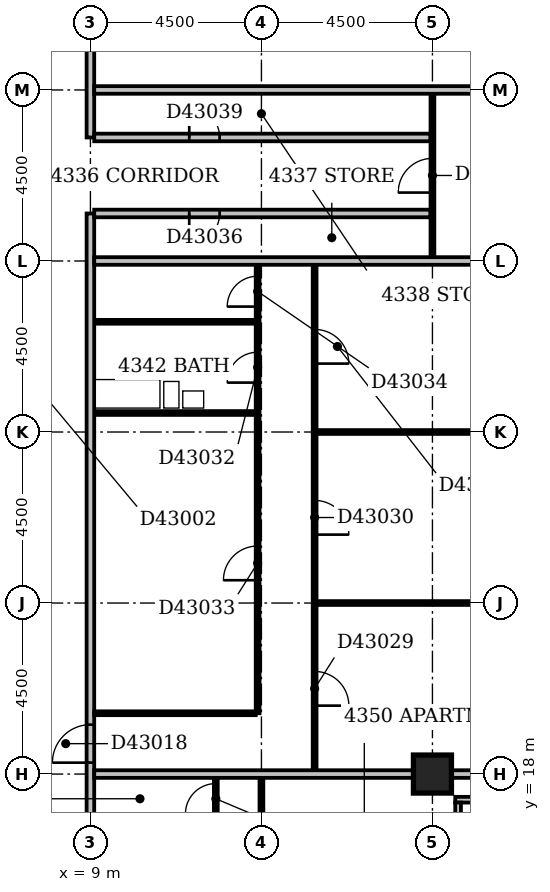
"""IFC4 building model, lengths in metres.
Left out: names, types, materials, properties, quantities, classifications, styles, units other than length and angle.
Written with IfcOpenShell. Run it as: python <this file> out.ifc"""

import sys

from ifc_helpers import new_model, si_unit, direction, frame, frame_2d, origin, origin_2d, place, context, subcontext, project, spatial, rectangle, extrude, element, fill, save


model = new_model("IFC4")
c1 = context("Model", 3, precision=1e-05, world=origin(), true_north=direction((0.0, 1.0)))
c2 = subcontext(c1, "Body", "Model", "MODEL_VIEW")
j1 = project(units=[si_unit("LENGTHUNIT", "METRE"), si_unit("PLANEANGLEUNIT", "RADIAN")], contexts=[c1])
p1 = place(None, origin())
s1 = spatial("IfcSite", under=j1, at=p1, CompositionType="ELEMENT")
p2 = place(p1, origin())
s2 = spatial("IfcBuilding", under=s1, at=p2, CompositionType="ELEMENT")
p3 = place(p2, frame((0.0, 0.0, 170.0)))
s3 = spatial("IfcBuildingStorey", under=s2, at=p3, CompositionType="ELEMENT", Elevation=170.0)
p4 = place(p3, frame((18.0, 18.0, -0.3), z_axis=(0.0, 0.0, 1.0), x_axis=(1.0, 0.0, 0.0)))
e1 = element("IfcColumn", 1, at=p4, inside=s3, PredefinedType="COLUMN", context=c2, shape_type="SweptSolid", body=[
    extrude(rectangle(XDim=1.0, YDim=1.0, at=origin_2d()), origin(), (0.0, 0.0, 1.0), 3.45),
])
p5 = place(p3, frame((18.675, 8.4, 0.0), z_axis=(0.0, 0.0, 1.0), x_axis=(0.0, 1.0, 0.0)))
e2 = element("IfcWall", 2, at=p5, inside=s3, PredefinedType="STANDARD", context=c2, shape_type="SweptSolid", body=[
    extrude(rectangle(XDim=8.85, YDim=0.15, at=frame_2d((4.425, 0.0))), origin(), (0.0, 0.0, 1.0), 2.5),
])
p6 = place(p5, frame((1.65, 0.0, 0.6)))
e3 = element("IfcOpeningElement", 3, at=p6, cuts=e2, PredefinedType="OPENING", context=c2, shape_type="SweptSolid", body=[
    extrude(rectangle(XDim=2.4, YDim=1.8, at=frame_2d((1.2, 0.9))), frame((0.0, 0.087, 0.0), z_axis=(0.0, -1.0, 0.0), x_axis=(1.0, 0.0, 0.0)), (0.0, 0.0, 1.0), 0.174),
])
p7 = place(p5, frame((6.15, 0.0, 0.6)))
e4 = element("IfcOpeningElement", 4, at=p7, cuts=e2, PredefinedType="OPENING", context=c2, shape_type="SweptSolid", body=[
    extrude(rectangle(XDim=2.4, YDim=1.8, at=frame_2d((1.2, 0.9))), frame((0.0, 0.087, 0.0), z_axis=(0.0, -1.0, 0.0), x_axis=(1.0, 0.0, 0.0)), (0.0, 0.0, 1.0), 0.174),
])
p8 = place(p3, frame((18.6, 17.325, 0.0), z_axis=(0.0, 0.0, 1.0), x_axis=(1.0, 0.0, 0.0)))
e5 = element("IfcWall", 5, at=p8, inside=s3, PredefinedType="STANDARD", context=c2, shape_type="SweptSolid", body=[
    extrude(rectangle(XDim=4.65, YDim=0.15, at=frame_2d((2.325, 0.0))), origin(), (0.0, 0.0, 1.0), 2.5),
])
p9 = place(p8, frame((0.45, 0.0, 0.6)))
e6 = element("IfcOpeningElement", 6, at=p9, cuts=e5, PredefinedType="OPENING", context=c2, shape_type="SweptSolid", body=[
    extrude(rectangle(XDim=2.4, YDim=1.8, at=frame_2d((1.2, 0.9))), frame((0.0, 0.087, 0.0), z_axis=(0.0, -1.0, 0.0), x_axis=(1.0, 0.0, 0.0)), (0.0, 0.0, 1.0), 0.174),
])
p10 = place(p3, frame((9.0, 5.0, 0.0), z_axis=(0.0, 0.0, 1.0), x_axis=(0.0, 1.0, 0.0)))
e7 = element("IfcWall", 7, at=p10, inside=s3, PredefinedType="PARTITIONING", context=c2, shape_type="SweptSolid", body=[
    extrude(rectangle(XDim=27.75, YDim=0.2, at=frame_2d((13.875, 0.0))), origin(), (0.0, 0.0, 1.0), 3.15),
])
p11 = place(p10, frame((13.3, 0.0, 0.0)))
e8 = element("IfcOpeningElement", 8, at=p11, cuts=e7, PredefinedType="OPENING", context=c2, shape_type="SweptSolid", body=[
    extrude(rectangle(XDim=1.0, YDim=2.1, at=frame_2d((0.5, 1.05))), frame((0.0, 0.112, 0.0), z_axis=(0.0, -1.0, 0.0), x_axis=(1.0, 0.0, 0.0)), (0.0, 0.0, 1.0), 0.224),
])
p12 = place(p10, frame((10.45, 0.0, 0.0)))
e9 = element("IfcOpeningElement", 9, at=p12, cuts=e7, PredefinedType="OPENING", context=c2, shape_type="SweptSolid", body=[
    extrude(rectangle(XDim=1.0, YDim=2.1, at=frame_2d((0.5, 1.05))), frame((0.0, 0.112, 0.0), z_axis=(0.0, -1.0, 0.0), x_axis=(1.0, 0.0, 0.0)), (0.0, 0.0, 1.0), 0.224),
])
p13 = place(p10, frame((5.95, 0.0, 0.0)))
e10 = element("IfcOpeningElement", 10, at=p13, cuts=e7, PredefinedType="OPENING", context=c2, shape_type="SweptSolid", body=[
    extrude(rectangle(XDim=1.0, YDim=2.1, at=frame_2d((0.5, 1.05))), frame((0.0, 0.112, 0.0), z_axis=(0.0, -1.0, 0.0), x_axis=(1.0, 0.0, 0.0)), (0.0, 0.0, 1.0), 0.224),
])
p14 = place(p10, frame((1.5, 0.0, 0.0)))
e11 = element("IfcOpeningElement", 11, at=p14, cuts=e7, PredefinedType="OPENING", context=c2, shape_type="SweptSolid", body=[
    extrude(rectangle(XDim=0.9, YDim=2.1, at=frame_2d((0.45, 1.05))), frame((0.0, 0.112, 0.0), z_axis=(0.0, -1.0, 0.0), x_axis=(1.0, 0.0, 0.0)), (0.0, 0.0, 1.0), 0.224),
])
p15 = place(p3, frame((13.5, 9.5, 0.0), z_axis=(0.0, 0.0, 1.0), x_axis=(0.0, 1.0, 0.0)))
e12 = element("IfcWall", 12, at=p15, inside=s3, PredefinedType="PARTITIONING", context=c2, shape_type="SweptSolid", body=[
    extrude(rectangle(XDim=8.4, YDim=0.1, at=frame_2d((4.2, 0.0))), origin(), (0.0, 0.0, 1.0), 3.15),
])
p16 = place(p15, frame((5.8, 0.0, 0.0)))
e13 = element("IfcOpeningElement", 13, at=p16, cuts=e12, PredefinedType="OPENING", context=c2, shape_type="SweptSolid", body=[
    extrude(rectangle(XDim=0.9, YDim=2.1, at=frame_2d((0.45, 1.05))), frame((0.0, 0.062, 0.0), z_axis=(0.0, -1.0, 0.0), x_axis=(1.0, 0.0, 0.0)), (0.0, 0.0, 1.0), 0.124),
])
p17 = place(p15, frame((1.3, 0.0, 0.0)))
e14 = element("IfcOpeningElement", 14, at=p17, cuts=e12, PredefinedType="OPENING", context=c2, shape_type="SweptSolid", body=[
    extrude(rectangle(XDim=0.9, YDim=2.1, at=frame_2d((0.45, 1.05))), frame((0.0, 0.062, 0.0), z_axis=(0.0, -1.0, 0.0), x_axis=(1.0, 0.0, 0.0)), (0.0, 0.0, 1.0), 0.124),
])
p18 = place(p3, frame((12.3, 16.7, 0.0), z_axis=(0.0, 0.0, 1.0), x_axis=(0.0, 1.0, 0.0)))
e15 = element("IfcWall", 15, at=p18, inside=s3, PredefinedType="PARTITIONING", context=c2, shape_type="SweptSolid", body=[
    extrude(rectangle(XDim=1.2, YDim=0.1, at=frame_2d((0.6, 0.0))), origin(), (0.0, 0.0, 1.0), 3.15),
])
p19 = place(p18, frame((0.25, 0.0, 0.0)))
e16 = element("IfcOpeningElement", 16, at=p19, cuts=e15, PredefinedType="OPENING", context=c2, shape_type="SweptSolid", body=[
    extrude(rectangle(XDim=0.8, YDim=2.1, at=frame_2d((0.4, 1.05))), frame((0.0, 0.062, 0.0), z_axis=(0.0, -1.0, 0.0), x_axis=(1.0, 0.0, 0.0)), (0.0, 0.0, 1.0), 0.124),
])
p20 = place(p3, frame((9.1, 18.0, 0.0), z_axis=(0.0, 0.0, 1.0), x_axis=(1.0, 0.0, 0.0)))
e17 = element("IfcWall", 17, at=p20, inside=s3, PredefinedType="PARTITIONING", context=c2, shape_type="SweptSolid", body=[
    extrude(rectangle(XDim=8.4, YDim=0.2, at=frame_2d((4.2, 0.0))), origin(), (0.0, 0.0, 1.0), 2.45),
])
p21 = place(p3, frame((18.5, 18.0, 0.0), z_axis=(0.0, 0.0, 1.0), x_axis=(1.0, 0.0, 0.0)))
e18 = element("IfcWall", 18, at=p21, inside=s3, PredefinedType="PARTITIONING", context=c2, shape_type="SweptSolid", body=[
    extrude(rectangle(XDim=3.5, YDim=0.2, at=frame_2d((1.75, 0.0))), origin(), (0.0, 0.0, 1.0), 2.5),
])
p22 = place(p3, frame((14.9, 18.1, 0.0), z_axis=(0.0, 0.0, 1.0), x_axis=(0.0, 1.0, 0.0)))
e19 = element("IfcWall", 19, at=p22, inside=s3, PredefinedType="PARTITIONING", context=c2, shape_type="SweptSolid", body=[
    extrude(rectangle(XDim=13.3, YDim=0.1, at=frame_2d((6.65, 0.0))), origin(), (0.0, 0.0, 1.0), 3.15),
])
p23 = place(p22, frame((1.7, 0.0, 0.0)))
e20 = element("IfcOpeningElement", 20, at=p23, cuts=e19, PredefinedType="OPENING", context=c2, shape_type="SweptSolid", body=[
    extrude(rectangle(XDim=0.9, YDim=2.1, at=frame_2d((0.45, 1.05))), frame((0.0, 0.062, 0.0), z_axis=(0.0, -1.0, 0.0), x_axis=(1.0, 0.0, 0.0)), (0.0, 0.0, 1.0), 0.124),
])
p24 = place(p22, frame((6.2, 0.0, 0.0)))
e21 = element("IfcOpeningElement", 21, at=p24, cuts=e19, PredefinedType="OPENING", context=c2, shape_type="SweptSolid", body=[
    extrude(rectangle(XDim=0.9, YDim=2.1, at=frame_2d((0.45, 1.05))), frame((0.0, 0.062, 0.0), z_axis=(0.0, -1.0, 0.0), x_axis=(1.0, 0.0, 0.0)), (0.0, 0.0, 1.0), 0.124),
])
p25 = place(p22, frame((10.7, 0.0, 0.0)))
e22 = element("IfcOpeningElement", 22, at=p25, cuts=e19, PredefinedType="OPENING", context=c2, shape_type="SweptSolid", body=[
    extrude(rectangle(XDim=0.9, YDim=2.1, at=frame_2d((0.45, 1.05))), frame((0.0, 0.062, 0.0), z_axis=(0.0, -1.0, 0.0), x_axis=(1.0, 0.0, 0.0)), (0.0, 0.0, 1.0), 0.124),
])
p26 = place(p3, frame((9.1, 19.6, 0.0), z_axis=(0.0, 0.0, 1.0), x_axis=(1.0, 0.0, 0.0)))
e23 = element("IfcWall", 23, at=p26, inside=s3, PredefinedType="PARTITIONING", context=c2, shape_type="SweptSolid", body=[
    extrude(rectangle(XDim=4.25, YDim=0.1, at=frame_2d((2.125, 0.0))), origin(), (0.0, 0.0, 1.0), 3.15),
])
p27 = place(p3, frame((13.4, 19.6, 0.0), z_axis=(0.0, 0.0, 1.0), x_axis=(0.0, 1.0, 0.0)))
e24 = element("IfcWall", 24, at=p27, inside=s3, PredefinedType="PARTITIONING", context=c2, shape_type="SweptSolid", body=[
    extrude(rectangle(XDim=11.8, YDim=0.1, at=frame_2d((5.9, 0.0))), origin(), (0.0, 0.0, 1.0), 3.15),
])
p28 = place(p27, frame((8.7, 0.0, 0.0)))
e25 = element("IfcOpeningElement", 25, at=p28, cuts=e24, PredefinedType="OPENING", context=c2, shape_type="SweptSolid", body=[
    extrude(rectangle(XDim=0.8, YDim=2.1, at=frame_2d((0.4, 1.05))), frame((0.0, 0.062, 0.0), z_axis=(0.0, -1.0, 0.0), x_axis=(1.0, 0.0, 0.0)), (0.0, 0.0, 1.0), 0.124),
])
p29 = place(p27, frame((3.5, 0.0, 0.0)))
e26 = element("IfcOpeningElement", 26, at=p29, cuts=e24, PredefinedType="OPENING", context=c2, shape_type="SweptSolid", body=[
    extrude(rectangle(XDim=0.9, YDim=2.1, at=frame_2d((0.45, 1.05))), frame((0.0, 0.062, 0.0), z_axis=(0.0, -1.0, 0.0), x_axis=(1.0, 0.0, 0.0)), (0.0, 0.0, 1.0), 0.124),
])
p30 = place(p27, frame((10.7, 0.0, 0.0)))
e27 = element("IfcOpeningElement", 27, at=p30, cuts=e24, PredefinedType="OPENING", context=c2, shape_type="SweptSolid", body=[
    extrude(rectangle(XDim=0.8, YDim=2.1, at=frame_2d((0.4, 1.05))), frame((0.0, 0.062, 0.0), z_axis=(0.0, -1.0, 0.0), x_axis=(1.0, 0.0, 0.0)), (0.0, 0.0, 1.0), 0.124),
])
p31 = place(p3, frame((14.95, 22.5, 0.0), z_axis=(0.0, 0.0, 1.0), x_axis=(1.0, 0.0, 0.0)))
e28 = element("IfcWall", 28, at=p31, inside=s3, PredefinedType="PARTITIONING", context=c2, shape_type="SweptSolid", body=[
    extrude(rectangle(XDim=7.05, YDim=0.1, at=frame_2d((3.525, 0.0))), origin(), (0.0, 0.0, 1.0), 3.15),
])
p32 = place(p3, frame((14.95, 27.0, 0.0), z_axis=(0.0, 0.0, 1.0), x_axis=(1.0, 0.0, 0.0)))
e29 = element("IfcWall", 29, at=p32, inside=s3, PredefinedType="PARTITIONING", context=c2, shape_type="SweptSolid", body=[
    extrude(rectangle(XDim=7.05, YDim=0.1, at=frame_2d((3.525, 0.0))), origin(), (0.0, 0.0, 1.0), 2.55),
])
p33 = place(p3, frame((9.1, 27.5, 0.0), z_axis=(0.0, 0.0, 1.0), x_axis=(1.0, 0.0, 0.0)))
e30 = element("IfcWall", 30, at=p33, inside=s3, PredefinedType="PLUMBINGWALL", context=c2, shape_type="SweptSolid", body=[
    extrude(rectangle(XDim=4.25, YDim=0.1, at=frame_2d((2.125, 0.0))), origin(), (0.0, 0.0, 1.0), 2.55),
])
p34 = place(p3, frame((9.1, 29.9, 0.0), z_axis=(0.0, 0.0, 1.0), x_axis=(1.0, 0.0, 0.0)))
e31 = element("IfcWall", 31, at=p34, inside=s3, PredefinedType="PLUMBINGWALL", context=c2, shape_type="SweptSolid", body=[
    extrude(rectangle(XDim=4.25, YDim=0.1, at=frame_2d((2.125, 0.0))), origin(), (0.0, 0.0, 1.0), 3.15),
])
p35 = place(p3, frame((9.1, 31.5, 0.0), z_axis=(0.0, 0.0, 1.0), x_axis=(1.0, 0.0, 0.0)))
e32 = element("IfcWall", 32, at=p35, inside=s3, PredefinedType="PARTITIONING", context=c2, shape_type="SweptSolid", body=[
    extrude(rectangle(XDim=12.9, YDim=0.2, at=frame_2d((6.45, 0.0))), origin(), (0.0, 0.0, 1.0), 3.15),
])
p36 = place(p3, frame((18.0, 31.6, 0.0), z_axis=(0.0, 0.0, 1.0), x_axis=(0.0, 1.0, 0.0)))
e33 = element("IfcWall", 33, at=p36, inside=s3, PredefinedType="PARTITIONING", context=c2, shape_type="SweptSolid", body=[
    extrude(rectangle(XDim=4.3, YDim=0.1, at=frame_2d((2.15, 0.0))), origin(), (0.0, 0.0, 1.0), 3.15),
])
p37 = place(p36, frame((1.7, 0.0, 0.0)))
e34 = element("IfcOpeningElement", 34, at=p37, cuts=e33, PredefinedType="OPENING", context=c2, shape_type="SweptSolid", body=[
    extrude(rectangle(XDim=0.9, YDim=2.1, at=frame_2d((0.45, 1.05))), frame((0.0, 0.062, 0.0), z_axis=(0.0, -1.0, 0.0), x_axis=(1.0, 0.0, 0.0)), (0.0, 0.0, 1.0), 0.124),
])
p38 = place(p3, frame((9.1, 32.75, 0.0), z_axis=(0.0, 0.0, 1.0), x_axis=(1.0, 0.0, 0.0)))
e35 = element("IfcWall", 35, at=p38, inside=s3, PredefinedType="PARTITIONING", context=c2, shape_type="SweptSolid", body=[
    extrude(rectangle(XDim=8.85, YDim=0.2, at=frame_2d((4.425, 0.0))), origin(), (0.0, 0.0, 1.0), 3.15),
])
p39 = place(p38, frame((2.5, 0.0, 0.0)))
e36 = element("IfcOpeningElement", 36, at=p39, cuts=e35, PredefinedType="OPENING", context=c2, shape_type="SweptSolid", body=[
    extrude(rectangle(XDim=0.8, YDim=2.1, at=frame_2d((0.4, 1.05))), frame((0.0, 0.112, 0.0), z_axis=(0.0, -1.0, 0.0), x_axis=(1.0, 0.0, 0.0)), (0.0, 0.0, 1.0), 0.224),
])
p40 = place(p3, frame((9.0, 34.75, 0.0), z_axis=(0.0, 0.0, 1.0), x_axis=(0.0, 1.0, 0.0)))
e37 = element("IfcWall", 37, at=p40, inside=s3, PredefinedType="PARTITIONING", context=c2, shape_type="SweptSolid", body=[
    extrude(rectangle(XDim=14.75, YDim=0.2, at=frame_2d((7.375, 0.0))), origin(), (0.0, 0.0, 1.0), 3.15),
])
p41 = place(p40, frame((3.0, 0.0, 0.0)))
e38 = element("IfcOpeningElement", 38, at=p41, cuts=e37, PredefinedType="OPENING", context=c2, shape_type="SweptSolid", body=[
    extrude(rectangle(XDim=0.9, YDim=2.1, at=frame_2d((0.45, 1.05))), frame((0.0, 0.112, 0.0), z_axis=(0.0, -1.0, 0.0), x_axis=(1.0, 0.0, 0.0)), (0.0, 0.0, 1.0), 0.224),
])
p42 = place(p40, frame((7.5, 0.0, 0.0)))
e39 = element("IfcOpeningElement", 39, at=p42, cuts=e37, PredefinedType="OPENING", context=c2, shape_type="SweptSolid", body=[
    extrude(rectangle(XDim=0.9, YDim=2.1, at=frame_2d((0.45, 1.05))), frame((0.0, 0.112, 0.0), z_axis=(0.0, -1.0, 0.0), x_axis=(1.0, 0.0, 0.0)), (0.0, 0.0, 1.0), 0.224),
])
p43 = place(p3, frame((9.1, 34.75, 0.0), z_axis=(0.0, 0.0, 1.0), x_axis=(1.0, 0.0, 0.0)))
e40 = element("IfcWall", 40, at=p43, inside=s3, PredefinedType="PARTITIONING", context=c2, shape_type="SweptSolid", body=[
    extrude(rectangle(XDim=8.85, YDim=0.2, at=frame_2d((4.425, 0.0))), origin(), (0.0, 0.0, 1.0), 3.15),
])
p44 = place(p43, frame((2.5, 0.0, 0.0)))
e41 = element("IfcOpeningElement", 41, at=p44, cuts=e40, PredefinedType="OPENING", context=c2, shape_type="SweptSolid", body=[
    extrude(rectangle(XDim=0.8, YDim=2.1, at=frame_2d((0.4, 1.05))), frame((0.0, 0.112, 0.0), z_axis=(0.0, -1.0, 0.0), x_axis=(1.0, 0.0, 0.0)), (0.0, 0.0, 1.0), 0.224),
])
p45 = place(p3, frame((9.1, 36.0, 0.0), z_axis=(0.0, 0.0, 1.0), x_axis=(1.0, 0.0, 0.0)))
e42 = element("IfcWall", 42, at=p45, inside=s3, PredefinedType="PARTITIONING", context=c2, shape_type="SweptSolid", body=[
    extrude(rectangle(XDim=12.9, YDim=0.2, at=frame_2d((6.45, 0.0))), origin(), (0.0, 0.0, 1.0), 3.15),
])
p46 = place(p11, origin())
e43 = element("IfcDoor", 43, at=p46, inside=s3, OperationType="SINGLE_SWING_LEFT", PredefinedType="DOOR", context=c2, shape_type="SweptSolid", body=[
    extrude(rectangle(XDim=1.0, YDim=2.1, at=frame_2d((0.5, 1.05))), frame((0.0, 0.025, 0.0), z_axis=(0.0, -1.0, 0.0), x_axis=(1.0, 0.0, 0.0)), (0.0, 0.0, 1.0), 0.05),
])
fill(e8, e43)
p47 = place(p19, origin())
e44 = element("IfcDoor", 44, at=p47, inside=s3, OperationType="SINGLE_SWING_LEFT", PredefinedType="DOOR", context=c2, shape_type="SweptSolid", body=[
    extrude(rectangle(XDim=0.8, YDim=2.1, at=frame_2d((0.4, 1.05))), frame((0.0, 0.025, 0.0), z_axis=(0.0, -1.0, 0.0), x_axis=(1.0, 0.0, 0.0)), (0.0, 0.0, 1.0), 0.05),
])
fill(e16, e44)
p48 = place(p23, frame((0.9, 0.0, 0.0), z_axis=(0.0, 0.0, 1.0), x_axis=(-1.0, 0.0, 0.0)))
e45 = element("IfcDoor", 45, at=p48, inside=s3, OperationType="SINGLE_SWING_RIGHT", PredefinedType="DOOR", context=c2, shape_type="SweptSolid", body=[
    extrude(rectangle(XDim=0.9, YDim=2.1, at=frame_2d((0.45, 1.05))), frame((0.0, 0.025, 0.0), z_axis=(0.0, -1.0, 0.0), x_axis=(1.0, 0.0, 0.0)), (0.0, 0.0, 1.0), 0.05),
])
fill(e20, e45)
p49 = place(p24, frame((0.9, 0.0, 0.0), z_axis=(0.0, 0.0, 1.0), x_axis=(-1.0, 0.0, 0.0)))
e46 = element("IfcDoor", 46, at=p49, inside=s3, OperationType="SINGLE_SWING_RIGHT", PredefinedType="DOOR", context=c2, shape_type="SweptSolid", body=[
    extrude(rectangle(XDim=0.9, YDim=2.1, at=frame_2d((0.45, 1.05))), frame((0.0, 0.025, 0.0), z_axis=(0.0, -1.0, 0.0), x_axis=(1.0, 0.0, 0.0)), (0.0, 0.0, 1.0), 0.05),
])
fill(e21, e46)
p50 = place(p25, frame((0.9, 0.0, 0.0), z_axis=(0.0, 0.0, 1.0), x_axis=(-1.0, 0.0, 0.0)))
e47 = element("IfcDoor", 47, at=p50, inside=s3, OperationType="SINGLE_SWING_RIGHT", PredefinedType="DOOR", context=c2, shape_type="SweptSolid", body=[
    extrude(rectangle(XDim=0.9, YDim=2.1, at=frame_2d((0.45, 1.05))), frame((0.0, 0.025, 0.0), z_axis=(0.0, -1.0, 0.0), x_axis=(1.0, 0.0, 0.0)), (0.0, 0.0, 1.0), 0.05),
])
fill(e22, e47)
p51 = place(p28, origin())
e48 = element("IfcDoor", 48, at=p51, inside=s3, OperationType="SINGLE_SWING_LEFT", PredefinedType="DOOR", context=c2, shape_type="SweptSolid", body=[
    extrude(rectangle(XDim=0.8, YDim=2.1, at=frame_2d((0.4, 1.05))), frame((0.0, 0.025, 0.0), z_axis=(0.0, -1.0, 0.0), x_axis=(1.0, 0.0, 0.0)), (0.0, 0.0, 1.0), 0.05),
])
fill(e25, e48)
p52 = place(p29, origin())
e49 = element("IfcDoor", 49, at=p52, inside=s3, OperationType="SINGLE_SWING_LEFT", PredefinedType="DOOR", context=c2, shape_type="SweptSolid", body=[
    extrude(rectangle(XDim=0.9, YDim=2.1, at=frame_2d((0.45, 1.05))), frame((0.0, 0.025, 0.0), z_axis=(0.0, -1.0, 0.0), x_axis=(1.0, 0.0, 0.0)), (0.0, 0.0, 1.0), 0.05),
])
fill(e26, e49)
p53 = place(p30, origin())
e50 = element("IfcDoor", 50, at=p53, inside=s3, OperationType="SINGLE_SWING_LEFT", PredefinedType="DOOR", context=c2, shape_type="SweptSolid", body=[
    extrude(rectangle(XDim=0.8, YDim=2.1, at=frame_2d((0.4, 1.05))), frame((0.0, 0.025, 0.0), z_axis=(0.0, -1.0, 0.0), x_axis=(1.0, 0.0, 0.0)), (0.0, 0.0, 1.0), 0.05),
])
fill(e27, e50)
p54 = place(p37, origin())
e51 = element("IfcDoor", 51, at=p54, inside=s3, OperationType="SINGLE_SWING_LEFT", PredefinedType="DOOR", context=c2, shape_type="SweptSolid", body=[
    extrude(rectangle(XDim=0.9, YDim=2.1, at=frame_2d((0.45, 1.05))), frame((0.0, 0.025, 0.0), z_axis=(0.0, -1.0, 0.0), x_axis=(1.0, 0.0, 0.0)), (0.0, 0.0, 1.0), 0.05),
])
fill(e34, e51)
p55 = place(p39, frame((0.8, 0.0, 0.0), z_axis=(0.0, 0.0, 1.0), x_axis=(-1.0, 0.0, 0.0)))
e52 = element("IfcDoor", 52, at=p55, inside=s3, OperationType="SINGLE_SWING_RIGHT", PredefinedType="DOOR", context=c2, shape_type="SweptSolid", body=[
    extrude(rectangle(XDim=0.8, YDim=2.1, at=frame_2d((0.4, 1.05))), frame((0.0, 0.025, 0.0), z_axis=(0.0, -1.0, 0.0), x_axis=(1.0, 0.0, 0.0)), (0.0, 0.0, 1.0), 0.05),
])
fill(e36, e52)
p56 = place(p44, origin())
e53 = element("IfcDoor", 53, at=p56, inside=s3, OperationType="SINGLE_SWING_LEFT", PredefinedType="DOOR", context=c2, shape_type="SweptSolid", body=[
    extrude(rectangle(XDim=0.8, YDim=2.1, at=frame_2d((0.4, 1.05))), frame((0.0, 0.025, 0.0), z_axis=(0.0, -1.0, 0.0), x_axis=(1.0, 0.0, 0.0)), (0.0, 0.0, 1.0), 0.05),
])
fill(e41, e53)
save(model, sys.argv[1])
